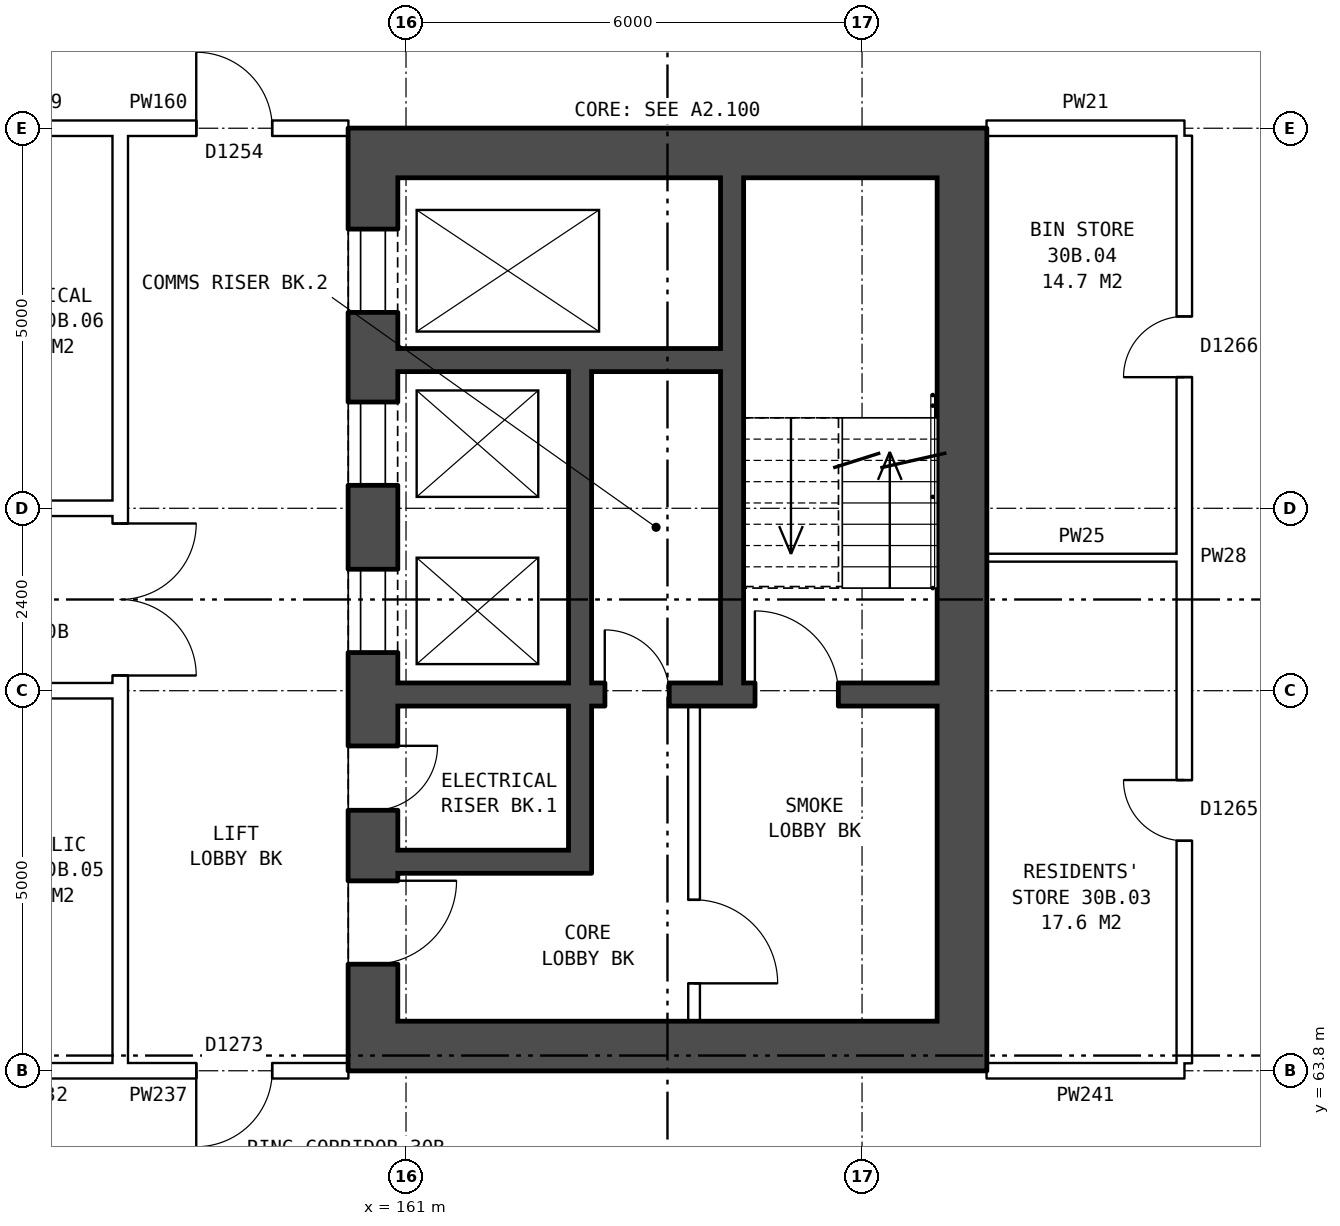
"""IFC4 building model, lengths in metres.
Left out: names, types, materials, properties, quantities, classifications, styles, units other than length and angle.
Written with IfcOpenShell. Run it as: python <this file> out.ifc"""

import sys

from ifc_helpers import new_model, si_unit, direction, frame, frame_2d, origin, place, context, subcontext, project, spatial, rectangle, extrude, element, fill, save


model = new_model("IFC4")
c1 = context("Model", 3, precision=1e-05, world=origin(), true_north=direction((0.0, 1.0)))
c2 = subcontext(c1, "Body", "Model", "MODEL_VIEW")
j1 = project(units=[si_unit("LENGTHUNIT", "METRE"), si_unit("PLANEANGLEUNIT", "RADIAN")], contexts=[c1])
p1 = place(None, origin())
s1 = spatial("IfcSite", under=j1, at=p1, CompositionType="ELEMENT")
p2 = place(p1, origin())
s2 = spatial("IfcBuilding", under=s1, at=p2, CompositionType="ELEMENT")
p3 = place(p2, frame((0.0, 0.0, 108.8)))
s3 = spatial("IfcBuildingStorey", under=s2, at=p3, CompositionType="ELEMENT", Elevation=108.8)
p4 = place(p3, frame((160.565, 75.55, 0.0), z_axis=(0.0, 0.0, 1.0), x_axis=(0.0, -1.0, 0.0)))
e1 = element("IfcWall", 1, at=p4, inside=s3, PredefinedType="SHEAR", context=c2, shape_type="SweptSolid", body=[
    extrude(rectangle(XDim=11.1, YDim=0.65, at=frame_2d((5.55, 0.0))), origin(), (0.0, 0.0, 1.0), 2.85),
])
p5 = place(p4, frame((0.675, 0.0, 0.0)))
e2 = element("IfcOpeningElement", 2, at=p5, cuts=e1, PredefinedType="OPENING", context=c2, shape_type="SweptSolid", body=[
    extrude(rectangle(XDim=1.1, YDim=2.1, at=frame_2d((0.55, 1.05))), frame((0.0, 0.335, 0.0), z_axis=(0.0, -1.0, 0.0), x_axis=(1.0, 0.0, 0.0)), (0.0, 0.0, 1.0), 0.67),
])
p6 = place(p4, frame((2.95, 0.0, 0.0)))
e3 = element("IfcOpeningElement", 3, at=p6, cuts=e1, PredefinedType="OPENING", context=c2, shape_type="SweptSolid", body=[
    extrude(rectangle(XDim=1.1, YDim=2.1, at=frame_2d((0.55, 1.05))), frame((0.0, 0.335, 0.0), z_axis=(0.0, -1.0, 0.0), x_axis=(1.0, 0.0, 0.0)), (0.0, 0.0, 1.0), 0.67),
])
p7 = place(p4, frame((5.15, 0.0, 0.0)))
e4 = element("IfcOpeningElement", 4, at=p7, cuts=e1, PredefinedType="OPENING", context=c2, shape_type="SweptSolid", body=[
    extrude(rectangle(XDim=1.1, YDim=2.1, at=frame_2d((0.55, 1.05))), frame((0.0, 0.335, 0.0), z_axis=(0.0, -1.0, 0.0), x_axis=(1.0, 0.0, 0.0)), (0.0, 0.0, 1.0), 0.67),
])
p8 = place(p4, frame((9.25, 0.0, 0.0)))
e5 = element("IfcOpeningElement", 5, at=p8, cuts=e1, PredefinedType="OPENING", context=c2, shape_type="SweptSolid", body=[
    extrude(rectangle(XDim=1.1, YDim=2.1, at=frame_2d((0.55, 1.05))), frame((0.0, 0.335, 0.0), z_axis=(0.0, -1.0, 0.0), x_axis=(1.0, 0.0, 0.0)), (0.0, 0.0, 1.0), 0.67),
])
p9 = place(p4, frame((7.475, 0.0, 0.0)))
e6 = element("IfcOpeningElement", 6, at=p9, cuts=e1, PredefinedType="OPENING", context=c2, shape_type="SweptSolid", body=[
    extrude(rectangle(XDim=0.85, YDim=2.1, at=frame_2d((0.425, 1.05))), frame((0.0, 0.335, 0.0), z_axis=(0.0, -1.0, 0.0), x_axis=(1.0, 0.0, 0.0)), (0.0, 0.0, 1.0), 0.67),
])
p10 = place(p3, frame((168.315, 75.55, 0.0), z_axis=(0.0, 0.0, 1.0), x_axis=(0.0, -1.0, 0.0)))
e7 = element("IfcWall", 7, at=p10, inside=s3, PredefinedType="SHEAR", context=c2, shape_type="SweptSolid", body=[
    extrude(rectangle(XDim=11.1, YDim=0.65, at=frame_2d((5.55, 0.0))), origin(), (0.0, 0.0, 1.0), 2.85),
])
for number, where, z_axis, x_axis in (
    (8, (160.24, 75.875, 0.0), (0.0, 0.0, 1.0), (1.0, 0.0, 0.0)),
    (9, (160.24, 64.125, 0.0), (0.0, 0.0, 1.0), (1.0, 0.0, 0.0)),
):
    element("IfcWall", number, at=place(p3, frame(where, z_axis=z_axis, x_axis=x_axis)), inside=s3, PredefinedType="SHEAR", context=c2, shape_type="SweptSolid", body=[
        extrude(rectangle(XDim=8.4, YDim=0.65, at=frame_2d((4.2, 0.0))), origin(), (0.0, 0.0, 1.0), 2.85),
    ])
p11 = place(p3, frame((160.89, 73.15, 0.0), z_axis=(0.0, 0.0, 1.0), x_axis=(1.0, 0.0, 0.0)))
e10 = element("IfcWall", 10, at=p11, inside=s3, PredefinedType="SHEAR", context=c2, shape_type="SweptSolid", body=[
    extrude(rectangle(XDim=4.25, YDim=0.3, at=frame_2d((2.125, 0.0))), origin(), (0.0, 0.0, 1.0), 2.85),
])
p12 = place(p3, frame((160.89, 68.75, 0.0), z_axis=(0.0, 0.0, 1.0), x_axis=(1.0, 0.0, 0.0)))
e11 = element("IfcWall", 11, at=p12, inside=s3, PredefinedType="SHEAR", context=c2, shape_type="SweptSolid", body=[
    extrude(rectangle(XDim=7.1, YDim=0.3, at=frame_2d((3.55, 0.0))), origin(), (0.0, 0.0, 1.0), 2.85),
])
p13 = place(p12, frame((4.7, 0.0, 0.0)))
e12 = element("IfcOpeningElement", 12, at=p13, cuts=e11, PredefinedType="OPENING", context=c2, shape_type="SweptSolid", body=[
    extrude(rectangle(XDim=1.1, YDim=2.1, at=frame_2d((0.55, 1.05))), frame((0.0, 0.16, 0.0), z_axis=(0.0, -1.0, 0.0), x_axis=(1.0, 0.0, 0.0)), (0.0, 0.0, 1.0), 0.32),
])
p14 = place(p12, frame((2.725, 0.0, 0.0)))
e13 = element("IfcOpeningElement", 13, at=p14, cuts=e11, PredefinedType="OPENING", context=c2, shape_type="SweptSolid", body=[
    extrude(rectangle(XDim=0.85, YDim=2.1, at=frame_2d((0.425, 1.05))), frame((0.0, 0.16, 0.0), z_axis=(0.0, -1.0, 0.0), x_axis=(1.0, 0.0, 0.0)), (0.0, 0.0, 1.0), 0.32),
])
p15 = place(p3, frame((160.89, 66.55, 0.0), z_axis=(0.0, 0.0, 1.0), x_axis=(1.0, 0.0, 0.0)))
e14 = element("IfcWall", 14, at=p15, inside=s3, PredefinedType="SHEAR", context=c2, shape_type="SweptSolid", body=[
    extrude(rectangle(XDim=2.25, YDim=0.3, at=frame_2d((1.125, 0.0))), origin(), (0.0, 0.0, 1.0), 2.85),
])
p16 = place(p3, frame((163.29, 73.0, 0.0), z_axis=(0.0, 0.0, 1.0), x_axis=(0.0, -1.0, 0.0)))
e15 = element("IfcWall", 15, at=p16, inside=s3, PredefinedType="SHEAR", context=c2, shape_type="SweptSolid", body=[
    extrude(rectangle(XDim=4.1, YDim=0.3, at=frame_2d((2.05, 0.0))), origin(), (0.0, 0.0, 1.0), 2.85),
])
p17 = place(p3, frame((163.29, 68.6, 0.0), z_axis=(0.0, 0.0, 1.0), x_axis=(0.0, -1.0, 0.0)))
e16 = element("IfcWall", 16, at=p17, inside=s3, PredefinedType="SHEAR", context=c2, shape_type="SweptSolid", body=[
    extrude(rectangle(XDim=2.2, YDim=0.3, at=frame_2d((1.1, 0.0))), origin(), (0.0, 0.0, 1.0), 2.85),
])
p18 = place(p3, frame((164.79, 68.6, 0.0), z_axis=(0.0, 0.0, 1.0), x_axis=(0.0, -1.0, 0.0)))
e17 = element("IfcWall", 17, at=p18, inside=s3, PredefinedType="PARTITIONING", context=c2, shape_type="SweptSolid", body=[
    extrude(rectangle(XDim=4.15, YDim=0.15, at=frame_2d((2.075, 0.0))), origin(), (0.0, 0.0, 1.0), 2.85),
])
p19 = place(p18, frame((2.55, 0.0, 0.0)))
e18 = element("IfcOpeningElement", 18, at=p19, cuts=e17, PredefinedType="OPENING", context=c2, shape_type="SweptSolid", body=[
    extrude(rectangle(XDim=1.1, YDim=2.1, at=frame_2d((0.55, 1.05))), frame((0.0, 0.085, 0.0), z_axis=(0.0, -1.0, 0.0), x_axis=(1.0, 0.0, 0.0)), (0.0, 0.0, 1.0), 0.17),
])
p20 = place(p3, frame((165.29, 75.55, 0.0), z_axis=(0.0, 0.0, 1.0), x_axis=(0.0, -1.0, 0.0)))
e19 = element("IfcWall", 19, at=p20, inside=s3, PredefinedType="SHEAR", context=c2, shape_type="SweptSolid", body=[
    extrude(rectangle(XDim=6.65, YDim=0.3, at=frame_2d((3.325, 0.0))), origin(), (0.0, 0.0, 1.0), 2.85),
])
p21 = place(p3, frame((157.24, 63.9, 0.0), z_axis=(0.0, 0.0, 1.0), x_axis=(0.0, 1.0, 0.0)))
e20 = element("IfcWall", 20, at=p21, inside=s3, PredefinedType="PARTITIONING", context=c2, shape_type="SweptSolid", body=[
    extrude(rectangle(XDim=12.2, YDim=0.2, at=frame_2d((6.1, 0.0))), origin(), (0.0, 0.0, 1.0), 2.85),
])
p22 = place(p21, frame((5.1, 0.0, 0.0)))
e21 = element("IfcOpeningElement", 21, at=p22, cuts=e20, PredefinedType="OPENING", context=c2, shape_type="SweptSolid", body=[
    extrude(rectangle(XDim=2.0, YDim=2.1, at=frame_2d((1.0, 1.05))), frame((0.0, 0.11, 0.0), z_axis=(0.0, -1.0, 0.0), x_axis=(1.0, 0.0, 0.0)), (0.0, 0.0, 1.0), 0.22),
])
p23 = place(p3, frame((155.1, 63.8, 0.0), z_axis=(0.0, 0.0, 1.0), x_axis=(1.0, 0.0, 0.0)))
e22 = element("IfcWall", 22, at=p23, inside=s3, PredefinedType="PARTITIONING", context=c2, shape_type="SweptSolid", body=[
    extrude(rectangle(XDim=2.14, YDim=0.2, at=frame_2d((1.07, 0.0))), origin(), (0.0, 0.0, 1.0), 2.85),
])
p24 = place(p3, frame((157.24, 63.8, 0.0), z_axis=(0.0, 0.0, 1.0), x_axis=(1.0, 0.0, 0.0)))
e23 = element("IfcWall", 23, at=p24, inside=s3, PredefinedType="PARTITIONING", context=c2, shape_type="SweptSolid", body=[
    extrude(rectangle(XDim=3.0, YDim=0.2, at=frame_2d((1.5, 0.0))), origin(), (0.0, 0.0, 1.0), 2.85),
])
p25 = place(p24, frame((1.0, 0.0, 0.0)))
e24 = element("IfcOpeningElement", 24, at=p25, cuts=e23, PredefinedType="OPENING", context=c2, shape_type="SweptSolid", body=[
    extrude(rectangle(XDim=1.0, YDim=2.1, at=frame_2d((0.5, 1.05))), frame((0.0, 0.11, 0.0), z_axis=(0.0, -1.0, 0.0), x_axis=(1.0, 0.0, 0.0)), (0.0, 0.0, 1.0), 0.22),
])
p26 = place(p3, frame((168.64, 63.8, 0.0), z_axis=(0.0, 0.0, 1.0), x_axis=(1.0, 0.0, 0.0)))
e25 = element("IfcWall", 25, at=p26, inside=s3, PredefinedType="PARTITIONING", context=c2, shape_type="SweptSolid", body=[
    extrude(rectangle(XDim=2.6, YDim=0.2, at=frame_2d((1.3, 0.0))), origin(), (0.0, 0.0, 1.0), 2.85),
])
p27 = place(p3, frame((142.76, 68.8, 0.0), z_axis=(0.0, 0.0, 1.0), x_axis=(1.0, 0.0, 0.0)))
e26 = element("IfcWall", 26, at=p27, inside=s3, PredefinedType="PARTITIONING", context=c2, shape_type="SweptSolid", body=[
    extrude(rectangle(XDim=14.48, YDim=0.2, at=frame_2d((7.24, 0.0))), origin(), (0.0, 0.0, 1.0), 2.85),
])
p28 = place(p27, frame((4.24, 0.0, 0.0)))
e27 = element("IfcOpeningElement", 27, at=p28, cuts=e26, PredefinedType="OPENING", context=c2, shape_type="SweptSolid", body=[
    extrude(rectangle(XDim=1.0, YDim=2.1, at=frame_2d((0.5, 1.05))), frame((0.0, 0.11, 0.0), z_axis=(0.0, -1.0, 0.0), x_axis=(1.0, 0.0, 0.0)), (0.0, 0.0, 1.0), 0.22),
])
p29 = place(p27, frame((10.24, 0.0, 0.0)))
e28 = element("IfcOpeningElement", 28, at=p29, cuts=e26, PredefinedType="OPENING", context=c2, shape_type="SweptSolid", body=[
    extrude(rectangle(XDim=1.0, YDim=2.1, at=frame_2d((0.5, 1.05))), frame((0.0, 0.11, 0.0), z_axis=(0.0, -1.0, 0.0), x_axis=(1.0, 0.0, 0.0)), (0.0, 0.0, 1.0), 0.22),
])
p30 = place(p3, frame((168.64, 70.55, 0.0), z_axis=(0.0, 0.0, 1.0), x_axis=(1.0, 0.0, 0.0)))
e29 = element("IfcWall", 29, at=p30, inside=s3, PredefinedType="PARTITIONING", context=c2, shape_type="SweptSolid", body=[
    extrude(rectangle(XDim=2.5, YDim=0.1, at=frame_2d((1.25, 0.0))), origin(), (0.0, 0.0, 1.0), 2.85),
])
p31 = place(p3, frame((142.76, 71.2, 0.0), z_axis=(0.0, 0.0, 1.0), x_axis=(1.0, 0.0, 0.0)))
e30 = element("IfcWall", 30, at=p31, inside=s3, PredefinedType="PARTITIONING", context=c2, shape_type="SweptSolid", body=[
    extrude(rectangle(XDim=14.48, YDim=0.2, at=frame_2d((7.24, 0.0))), origin(), (0.0, 0.0, 1.0), 2.85),
])
p32 = place(p31, frame((4.24, 0.0, 0.0)))
e31 = element("IfcOpeningElement", 31, at=p32, cuts=e30, PredefinedType="OPENING", context=c2, shape_type="SweptSolid", body=[
    extrude(rectangle(XDim=1.0, YDim=2.1, at=frame_2d((0.5, 1.05))), frame((0.0, 0.11, 0.0), z_axis=(0.0, -1.0, 0.0), x_axis=(1.0, 0.0, 0.0)), (0.0, 0.0, 1.0), 0.22),
])
p33 = place(p31, frame((10.24, 0.0, 0.0)))
e32 = element("IfcOpeningElement", 32, at=p33, cuts=e30, PredefinedType="OPENING", context=c2, shape_type="SweptSolid", body=[
    extrude(rectangle(XDim=1.0, YDim=2.1, at=frame_2d((0.5, 1.05))), frame((0.0, 0.11, 0.0), z_axis=(0.0, -1.0, 0.0), x_axis=(1.0, 0.0, 0.0)), (0.0, 0.0, 1.0), 0.22),
])
p34 = place(p3, frame((155.1, 76.2, 0.0), z_axis=(0.0, 0.0, 1.0), x_axis=(1.0, 0.0, 0.0)))
e33 = element("IfcWall", 33, at=p34, inside=s3, PredefinedType="PARTITIONING", context=c2, shape_type="SweptSolid", body=[
    extrude(rectangle(XDim=2.14, YDim=0.2, at=frame_2d((1.07, 0.0))), origin(), (0.0, 0.0, 1.0), 2.85),
])
p35 = place(p3, frame((157.24, 76.2, 0.0), z_axis=(0.0, 0.0, 1.0), x_axis=(1.0, 0.0, 0.0)))
e34 = element("IfcWall", 34, at=p35, inside=s3, PredefinedType="PARTITIONING", context=c2, shape_type="SweptSolid", body=[
    extrude(rectangle(XDim=3.0, YDim=0.2, at=frame_2d((1.5, 0.0))), origin(), (0.0, 0.0, 1.0), 2.85),
])
p36 = place(p35, frame((1.0, 0.0, 0.0)))
e35 = element("IfcOpeningElement", 35, at=p36, cuts=e34, PredefinedType="OPENING", context=c2, shape_type="SweptSolid", body=[
    extrude(rectangle(XDim=1.0, YDim=2.1, at=frame_2d((0.5, 1.05))), frame((0.0, 0.11, 0.0), z_axis=(0.0, -1.0, 0.0), x_axis=(1.0, 0.0, 0.0)), (0.0, 0.0, 1.0), 0.22),
])
p37 = place(p3, frame((168.64, 76.2, 0.0), z_axis=(0.0, 0.0, 1.0), x_axis=(1.0, 0.0, 0.0)))
e36 = element("IfcWall", 36, at=p37, inside=s3, PredefinedType="PARTITIONING", context=c2, shape_type="SweptSolid", body=[
    extrude(rectangle(XDim=2.6, YDim=0.2, at=frame_2d((1.3, 0.0))), origin(), (0.0, 0.0, 1.0), 2.85),
])
p38 = place(p3, frame((171.24, 63.9, 0.0), z_axis=(0.0, 0.0, 1.0), x_axis=(0.0, 1.0, 0.0)))
e37 = element("IfcWall", 37, at=p38, inside=s3, PredefinedType="PARTITIONING", context=c2, shape_type="SweptSolid", body=[
    extrude(rectangle(XDim=12.2, YDim=0.2, at=frame_2d((6.1, 0.0))), origin(), (0.0, 0.0, 1.0), 2.85),
])
p39 = place(p38, frame((2.925, 0.0, 0.0)))
e38 = element("IfcOpeningElement", 38, at=p39, cuts=e37, PredefinedType="OPENING", context=c2, shape_type="SweptSolid", body=[
    extrude(rectangle(XDim=0.8, YDim=2.1, at=frame_2d((0.4, 1.05))), frame((0.0, 0.11, 0.0), z_axis=(0.0, -1.0, 0.0), x_axis=(1.0, 0.0, 0.0)), (0.0, 0.0, 1.0), 0.22),
])
p40 = place(p38, frame((9.025, 0.0, 0.0)))
e39 = element("IfcOpeningElement", 39, at=p40, cuts=e37, PredefinedType="OPENING", context=c2, shape_type="SweptSolid", body=[
    extrude(rectangle(XDim=0.8, YDim=2.1, at=frame_2d((0.4, 1.05))), frame((0.0, 0.11, 0.0), z_axis=(0.0, -1.0, 0.0), x_axis=(1.0, 0.0, 0.0)), (0.0, 0.0, 1.0), 0.22),
])
p41 = place(p5, origin())
e40 = element("IfcDoor", 40, at=p41, inside=s3, OperationType="DOUBLE_DOOR_SLIDING", PredefinedType="DOOR", context=c2, shape_type="SweptSolid", body=[
    extrude(rectangle(XDim=1.1, YDim=2.1, at=frame_2d((0.55, 1.05))), frame((0.0, 0.31, 0.0), z_axis=(0.0, -1.0, 0.0), x_axis=(1.0, 0.0, 0.0)), (0.0, 0.0, 1.0), 0.05),
])
fill(e2, e40)
p42 = place(p6, origin())
e41 = element("IfcDoor", 41, at=p42, inside=s3, OperationType="DOUBLE_DOOR_SLIDING", PredefinedType="DOOR", context=c2, shape_type="SweptSolid", body=[
    extrude(rectangle(XDim=1.1, YDim=2.1, at=frame_2d((0.55, 1.05))), frame((0.0, 0.31, 0.0), z_axis=(0.0, -1.0, 0.0), x_axis=(1.0, 0.0, 0.0)), (0.0, 0.0, 1.0), 0.05),
])
fill(e3, e41)
p43 = place(p7, origin())
e42 = element("IfcDoor", 42, at=p43, inside=s3, OperationType="DOUBLE_DOOR_SLIDING", PredefinedType="DOOR", context=c2, shape_type="SweptSolid", body=[
    extrude(rectangle(XDim=1.1, YDim=2.1, at=frame_2d((0.55, 1.05))), frame((0.0, 0.31, 0.0), z_axis=(0.0, -1.0, 0.0), x_axis=(1.0, 0.0, 0.0)), (0.0, 0.0, 1.0), 0.05),
])
fill(e4, e42)
p44 = place(p8, origin())
e43 = element("IfcDoor", 43, at=p44, inside=s3, OperationType="SINGLE_SWING_LEFT", PredefinedType="DOOR", context=c2, shape_type="SweptSolid", body=[
    extrude(rectangle(XDim=1.1, YDim=2.1, at=frame_2d((0.55, 1.05))), frame((0.0, 0.31, 0.0), z_axis=(0.0, -1.0, 0.0), x_axis=(1.0, 0.0, 0.0)), (0.0, 0.0, 1.0), 0.05),
])
fill(e5, e43)
p45 = place(p19, origin())
e44 = element("IfcDoor", 44, at=p45, inside=s3, OperationType="SINGLE_SWING_RIGHT", PredefinedType="DOOR", context=c2, shape_type="SweptSolid", body=[
    extrude(rectangle(XDim=1.1, YDim=2.1, at=frame_2d((0.55, 1.05))), frame((0.0, 0.025, 0.0), z_axis=(0.0, -1.0, 0.0), x_axis=(1.0, 0.0, 0.0)), (0.0, 0.0, 1.0), 0.05),
])
fill(e18, e44)
p46 = place(p13, origin())
e45 = element("IfcDoor", 45, at=p46, inside=s3, OperationType="SINGLE_SWING_LEFT", PredefinedType="DOOR", context=c2, shape_type="SweptSolid", body=[
    extrude(rectangle(XDim=1.1, YDim=2.1, at=frame_2d((0.55, 1.05))), frame((0.0, 0.025, 0.0), z_axis=(0.0, -1.0, 0.0), x_axis=(1.0, 0.0, 0.0)), (0.0, 0.0, 1.0), 0.05),
])
fill(e12, e45)
p47 = place(p9, origin())
e46 = element("IfcDoor", 46, at=p47, inside=s3, OperationType="SINGLE_SWING_LEFT", PredefinedType="DOOR", context=c2, shape_type="SweptSolid", body=[
    extrude(rectangle(XDim=0.85, YDim=2.1, at=frame_2d((0.425, 1.05))), frame((0.0, 0.31, 0.0), z_axis=(0.0, -1.0, 0.0), x_axis=(1.0, 0.0, 0.0)), (0.0, 0.0, 1.0), 0.05),
])
fill(e6, e46)
p48 = place(p14, origin())
e47 = element("IfcDoor", 47, at=p48, inside=s3, OperationType="SINGLE_SWING_LEFT", PredefinedType="DOOR", context=c2, shape_type="SweptSolid", body=[
    extrude(rectangle(XDim=0.85, YDim=2.1, at=frame_2d((0.425, 1.05))), frame((0.0, 0.025, 0.0), z_axis=(0.0, -1.0, 0.0), x_axis=(1.0, 0.0, 0.0)), (0.0, 0.0, 1.0), 0.05),
])
fill(e13, e47)
p49 = place(p22, frame((2.0, 0.0, 0.0), z_axis=(0.0, 0.0, 1.0), x_axis=(-1.0, 0.0, 0.0)))
e48 = element("IfcDoor", 48, at=p49, inside=s3, OperationType="DOUBLE_DOOR_SINGLE_SWING", PredefinedType="DOOR", context=c2, shape_type="SweptSolid", body=[
    extrude(rectangle(XDim=2.0, YDim=2.1, at=frame_2d((1.0, 1.05))), frame((0.0, 0.025, 0.0), z_axis=(0.0, -1.0, 0.0), x_axis=(1.0, 0.0, 0.0)), (0.0, 0.0, 1.0), 0.05),
])
fill(e21, e48)
p50 = place(p25, frame((1.0, 0.0, 0.0), z_axis=(0.0, 0.0, 1.0), x_axis=(-1.0, 0.0, 0.0)))
e49 = element("IfcDoor", 49, at=p50, inside=s3, OperationType="SINGLE_SWING_RIGHT", PredefinedType="DOOR", context=c2, shape_type="SweptSolid", body=[
    extrude(rectangle(XDim=1.0, YDim=2.1, at=frame_2d((0.5, 1.05))), frame((0.0, 0.025, 0.0), z_axis=(0.0, -1.0, 0.0), x_axis=(1.0, 0.0, 0.0)), (0.0, 0.0, 1.0), 0.05),
])
fill(e24, e49)
p51 = place(p36, origin())
e50 = element("IfcDoor", 50, at=p51, inside=s3, OperationType="SINGLE_SWING_LEFT", PredefinedType="DOOR", context=c2, shape_type="SweptSolid", body=[
    extrude(rectangle(XDim=1.0, YDim=2.1, at=frame_2d((0.5, 1.05))), frame((0.0, 0.025, 0.0), z_axis=(0.0, -1.0, 0.0), x_axis=(1.0, 0.0, 0.0)), (0.0, 0.0, 1.0), 0.05),
])
fill(e35, e50)
p52 = place(p39, origin())
e51 = element("IfcDoor", 51, at=p52, inside=s3, OperationType="SINGLE_SWING_RIGHT", PredefinedType="DOOR", context=c2, shape_type="SweptSolid", body=[
    extrude(rectangle(XDim=0.8, YDim=2.1, at=frame_2d((0.4, 1.05))), frame((0.0, 0.025, 0.0), z_axis=(0.0, -1.0, 0.0), x_axis=(1.0, 0.0, 0.0)), (0.0, 0.0, 1.0), 0.05),
])
fill(e38, e51)
p53 = place(p40, origin())
e52 = element("IfcDoor", 52, at=p53, inside=s3, OperationType="SINGLE_SWING_LEFT", PredefinedType="DOOR", context=c2, shape_type="SweptSolid", body=[
    extrude(rectangle(XDim=0.8, YDim=2.1, at=frame_2d((0.4, 1.05))), frame((0.0, 0.025, 0.0), z_axis=(0.0, -1.0, 0.0), x_axis=(1.0, 0.0, 0.0)), (0.0, 0.0, 1.0), 0.05),
])
fill(e39, e52)
save(model, sys.argv[1])
